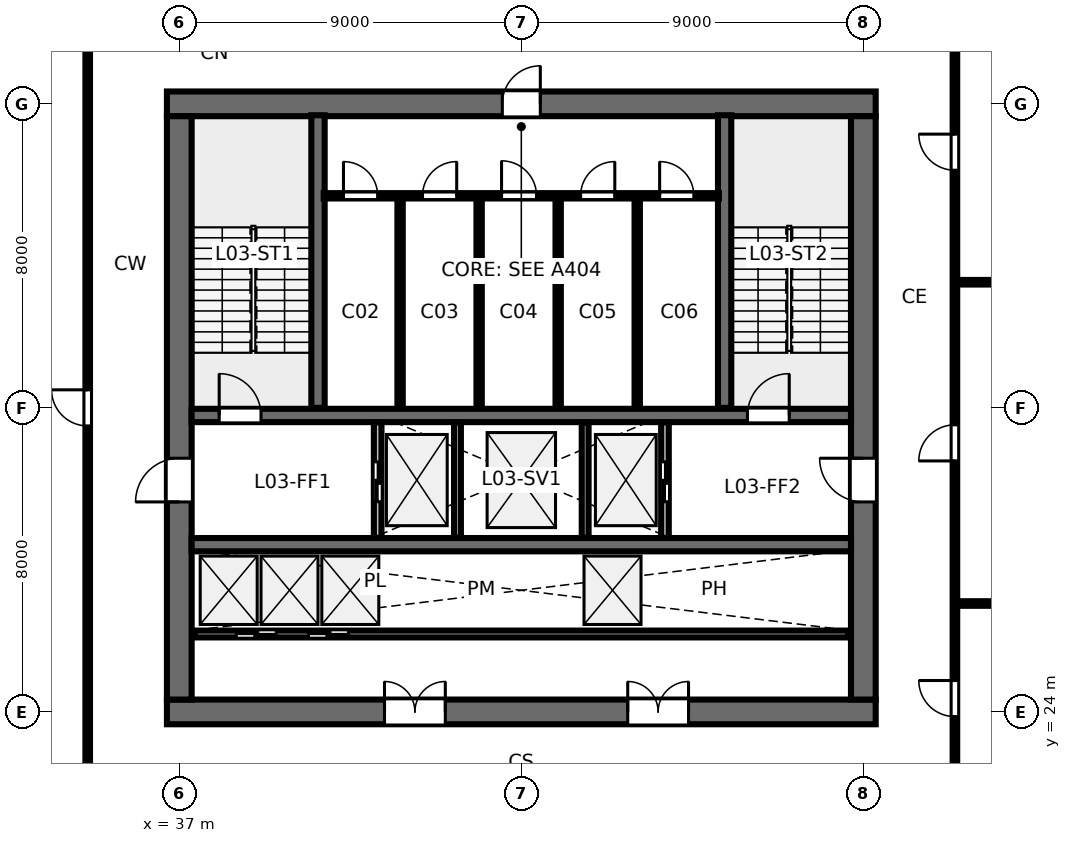
"""IFC4 building model, lengths in metres.
Left out: names, types, materials, properties, quantities, classifications, styles, units other than length and angle.
Written with IfcOpenShell. Run it as: python <this file> out.ifc"""

import sys

from ifc_helpers import new_model, si_unit, direction, frame, frame_2d, origin, place, context, subcontext, project, spatial, rectangle, extrude, element, fill, save


model = new_model("IFC4")
c1 = context("Model", 3, precision=1e-05, world=origin(), true_north=direction((0.0, 1.0)))
c2 = subcontext(c1, "Body", "Model", "MODEL_VIEW")
j1 = project(units=[si_unit("LENGTHUNIT", "METRE"), si_unit("PLANEANGLEUNIT", "RADIAN")], contexts=[c1])
p1 = place(None, origin())
s1 = spatial("IfcSite", under=j1, at=p1, CompositionType="ELEMENT")
p2 = place(p1, origin())
s2 = spatial("IfcBuilding", under=s1, at=p2, CompositionType="ELEMENT")
p3 = place(p2, frame((0.0, 0.0, 14.0)))
s3 = spatial("IfcBuildingStorey", under=s2, at=p3, CompositionType="ELEMENT", Elevation=14.0)
p4 = place(p3, frame((36.675, 24.0, 0.0), z_axis=(0.0, 0.0, 1.0), x_axis=(1.0, 0.0, 0.0)))
e1 = element("IfcWall", 1, at=p4, inside=s3, PredefinedType="SHEAR", context=c2, shape_type="SweptSolid", body=[
    extrude(rectangle(XDim=18.65, YDim=0.65, at=frame_2d((9.325, 0.0))), origin(), (0.0, 0.0, 1.0), 4.22),
])
p5 = place(p4, frame((5.725, 0.0, 0.0)))
e2 = element("IfcOpeningElement", 2, at=p5, cuts=e1, PredefinedType="OPENING", context=c2, shape_type="SweptSolid", body=[
    extrude(rectangle(XDim=1.6, YDim=2.15, at=frame_2d((0.8, 1.075))), frame((0.0, 0.335, 0.0), z_axis=(0.0, -1.0, 0.0), x_axis=(1.0, 0.0, 0.0)), (0.0, 0.0, 1.0), 0.67),
])
p6 = place(p4, frame((12.125, 0.0, 0.0)))
e3 = element("IfcOpeningElement", 3, at=p6, cuts=e1, PredefinedType="OPENING", context=c2, shape_type="SweptSolid", body=[
    extrude(rectangle(XDim=1.6, YDim=2.15, at=frame_2d((0.8, 1.075))), frame((0.0, 0.335, 0.0), z_axis=(0.0, -1.0, 0.0), x_axis=(1.0, 0.0, 0.0)), (0.0, 0.0, 1.0), 0.67),
])
p7 = place(p3, frame((36.675, 40.0, 0.0), z_axis=(0.0, 0.0, 1.0), x_axis=(1.0, 0.0, 0.0)))
e4 = element("IfcWall", 4, at=p7, inside=s3, PredefinedType="SHEAR", context=c2, shape_type="SweptSolid", body=[
    extrude(rectangle(XDim=18.65, YDim=0.65, at=frame_2d((9.325, 0.0))), origin(), (0.0, 0.0, 1.0), 4.22),
])
p8 = place(p7, frame((8.825, 0.0, 0.0)))
e5 = element("IfcOpeningElement", 5, at=p8, cuts=e4, PredefinedType="OPENING", context=c2, shape_type="SweptSolid", body=[
    extrude(rectangle(XDim=1.0, YDim=2.15, at=frame_2d((0.5, 1.075))), frame((0.0, 0.335, 0.0), z_axis=(0.0, -1.0, 0.0), x_axis=(1.0, 0.0, 0.0)), (0.0, 0.0, 1.0), 0.67),
])
p9 = place(p3, frame((37.0, 24.325, 0.0), z_axis=(0.0, 0.0, 1.0), x_axis=(0.0, 1.0, 0.0)))
e6 = element("IfcWall", 6, at=p9, inside=s3, PredefinedType="SHEAR", context=c2, shape_type="SweptSolid", body=[
    extrude(rectangle(XDim=15.35, YDim=0.65, at=frame_2d((7.675, 0.0))), origin(), (0.0, 0.0, 1.0), 4.22),
])
p10 = place(p9, frame((5.2, 0.0, 0.0)))
e7 = element("IfcOpeningElement", 7, at=p10, cuts=e6, PredefinedType="OPENING", context=c2, shape_type="SweptSolid", body=[
    extrude(rectangle(XDim=1.15, YDim=2.15, at=frame_2d((0.575, 1.075))), frame((0.0, 0.335, 0.0), z_axis=(0.0, -1.0, 0.0), x_axis=(1.0, 0.0, 0.0)), (0.0, 0.0, 1.0), 0.67),
])
p11 = place(p3, frame((55.0, 24.325, 0.0), z_axis=(0.0, 0.0, 1.0), x_axis=(0.0, 1.0, 0.0)))
e8 = element("IfcWall", 8, at=p11, inside=s3, PredefinedType="SHEAR", context=c2, shape_type="SweptSolid", body=[
    extrude(rectangle(XDim=15.35, YDim=0.65, at=frame_2d((7.675, 0.0))), origin(), (0.0, 0.0, 1.0), 4.22),
])
p12 = place(p11, frame((5.2, 0.0, 0.0)))
e9 = element("IfcOpeningElement", 9, at=p12, cuts=e8, PredefinedType="OPENING", context=c2, shape_type="SweptSolid", body=[
    extrude(rectangle(XDim=1.15, YDim=2.15, at=frame_2d((0.575, 1.075))), frame((0.0, 0.335, 0.0), z_axis=(0.0, -1.0, 0.0), x_axis=(1.0, 0.0, 0.0)), (0.0, 0.0, 1.0), 0.67),
])
p13 = place(p3, frame((37.325, 31.8, 0.0), z_axis=(0.0, 0.0, 1.0), x_axis=(1.0, 0.0, 0.0)))
e10 = element("IfcWall", 10, at=p13, inside=s3, PredefinedType="SHEAR", context=c2, shape_type="SweptSolid", body=[
    extrude(rectangle(XDim=17.35, YDim=0.35, at=frame_2d((8.675, 0.0))), origin(), (0.0, 0.0, 1.0), 4.22),
])
p14 = place(p13, frame((0.725, 0.0, 0.0)))
e11 = element("IfcOpeningElement", 11, at=p14, cuts=e10, PredefinedType="OPENING", context=c2, shape_type="SweptSolid", body=[
    extrude(rectangle(XDim=1.1, YDim=2.15, at=frame_2d((0.55, 1.075))), frame((0.0, 0.185, 0.0), z_axis=(0.0, -1.0, 0.0), x_axis=(1.0, 0.0, 0.0)), (0.0, 0.0, 1.0), 0.37),
])
p15 = place(p13, frame((14.625, 0.0, 0.0)))
e12 = element("IfcOpeningElement", 12, at=p15, cuts=e10, PredefinedType="OPENING", context=c2, shape_type="SweptSolid", body=[
    extrude(rectangle(XDim=1.1, YDim=2.15, at=frame_2d((0.55, 1.075))), frame((0.0, 0.185, 0.0), z_axis=(0.0, -1.0, 0.0), x_axis=(1.0, 0.0, 0.0)), (0.0, 0.0, 1.0), 0.37),
])
p16 = place(p3, frame((37.325, 28.4, 0.0), z_axis=(0.0, 0.0, 1.0), x_axis=(1.0, 0.0, 0.0)))
e13 = element("IfcWall", 13, at=p16, inside=s3, PredefinedType="SHEAR", context=c2, shape_type="SweptSolid", body=[
    extrude(rectangle(XDim=17.35, YDim=0.35, at=frame_2d((8.675, 0.0))), origin(), (0.0, 0.0, 1.0), 4.22),
])
for number, where, z_axis, x_axis in (
    (14, (40.65, 32.0, 0.0), (0.0, 0.0, 1.0), (0.0, 1.0, 0.0)),
    (15, (51.35, 32.0, 0.0), (0.0, 0.0, 1.0), (0.0, 1.0, 0.0)),
):
    element("IfcWall", number, at=place(p3, frame(where, z_axis=z_axis, x_axis=x_axis)), inside=s3, PredefinedType="SHEAR", context=c2, shape_type="SweptSolid", body=[
        extrude(rectangle(XDim=7.7, YDim=0.35, at=frame_2d((3.85, 0.0))), origin(), (0.0, 0.0, 1.0), 4.5),
    ])
for number, where, z_axis, x_axis in (
    (16, (42.81, 32.05, 0.0), (0.0, 0.0, 1.0), (0.0, 1.0, 0.0)),
    (17, (44.89, 32.05, 0.0), (0.0, 0.0, 1.0), (0.0, 1.0, 0.0)),
    (18, (46.97, 32.05, 0.0), (0.0, 0.0, 1.0), (0.0, 1.0, 0.0)),
    (19, (49.05, 32.05, 0.0), (0.0, 0.0, 1.0), (0.0, 1.0, 0.0)),
):
    element("IfcWall", number, at=place(p3, frame(where, z_axis=z_axis, x_axis=x_axis)), inside=s3, PredefinedType="PARTITIONING", context=c2, shape_type="SweptSolid", body=[
        extrude(rectangle(XDim=5.5, YDim=0.14, at=frame_2d((2.75, 0.0))), origin(), (0.0, 0.0, 1.0), 4.21),
    ])
p17 = place(p3, frame((40.8, 37.58, 0.0), z_axis=(0.0, 0.0, 1.0), x_axis=(1.0, 0.0, 0.0)))
e20 = element("IfcWall", 20, at=p17, inside=s3, PredefinedType="PARTITIONING", context=c2, shape_type="SweptSolid", body=[
    extrude(rectangle(XDim=10.4, YDim=0.14, at=frame_2d((5.2, 0.0))), origin(), (0.0, 0.0, 1.0), 4.21),
])
p18 = place(p17, frame((0.52, 0.0, 0.0)))
e21 = element("IfcOpeningElement", 21, at=p18, cuts=e20, PredefinedType="OPENING", context=c2, shape_type="SweptSolid", body=[
    extrude(rectangle(XDim=0.9, YDim=2.15, at=frame_2d((0.45, 1.075))), frame((0.0, 0.08, 0.0), z_axis=(0.0, -1.0, 0.0), x_axis=(1.0, 0.0, 0.0)), (0.0, 0.0, 1.0), 0.16),
])
p19 = place(p17, frame((2.6, 0.0, 0.0)))
e22 = element("IfcOpeningElement", 22, at=p19, cuts=e20, PredefinedType="OPENING", context=c2, shape_type="SweptSolid", body=[
    extrude(rectangle(XDim=0.9, YDim=2.15, at=frame_2d((0.45, 1.075))), frame((0.0, 0.08, 0.0), z_axis=(0.0, -1.0, 0.0), x_axis=(1.0, 0.0, 0.0)), (0.0, 0.0, 1.0), 0.16),
])
p20 = place(p17, frame((4.68, 0.0, 0.0)))
e23 = element("IfcOpeningElement", 23, at=p20, cuts=e20, PredefinedType="OPENING", context=c2, shape_type="SweptSolid", body=[
    extrude(rectangle(XDim=0.92, YDim=2.15, at=frame_2d((0.46, 1.075))), frame((0.0, 0.08, 0.0), z_axis=(0.0, -1.0, 0.0), x_axis=(1.0, 0.0, 0.0)), (0.0, 0.0, 1.0), 0.16),
])
p21 = place(p17, frame((6.76, 0.0, 0.0)))
e24 = element("IfcOpeningElement", 24, at=p21, cuts=e20, PredefinedType="OPENING", context=c2, shape_type="SweptSolid", body=[
    extrude(rectangle(XDim=0.9, YDim=2.15, at=frame_2d((0.45, 1.075))), frame((0.0, 0.08, 0.0), z_axis=(0.0, -1.0, 0.0), x_axis=(1.0, 0.0, 0.0)), (0.0, 0.0, 1.0), 0.16),
])
p22 = place(p17, frame((8.84, 0.0, 0.0)))
e25 = element("IfcOpeningElement", 25, at=p22, cuts=e20, PredefinedType="OPENING", context=c2, shape_type="SweptSolid", body=[
    extrude(rectangle(XDim=0.9, YDim=2.15, at=frame_2d((0.45, 1.075))), frame((0.0, 0.08, 0.0), z_axis=(0.0, -1.0, 0.0), x_axis=(1.0, 0.0, 0.0)), (0.0, 0.0, 1.0), 0.16),
])
p23 = place(p3, frame((42.22, 28.58, 0.0), z_axis=(0.0, 0.0, 1.0), x_axis=(0.0, 1.0, 0.0)))
e26 = element("IfcWall", 26, at=p23, inside=s3, PredefinedType="PARTITIONING", context=c2, shape_type="SweptSolid", body=[
    extrude(rectangle(XDim=3.04, YDim=0.2, at=frame_2d((1.52, 0.0))), origin(), (0.0, 0.0, 1.0), 4.21),
])
p24 = place(p23, frame((0.95, 0.0, 0.0)))
e27 = element("IfcOpeningElement", 27, at=p24, cuts=e26, PredefinedType="OPENING", context=c2, shape_type="SweptSolid", body=[
    extrude(rectangle(XDim=1.05, YDim=2.15, at=frame_2d((0.525, 1.075))), frame((0.0, 0.11, 0.0), z_axis=(0.0, -1.0, 0.0), x_axis=(1.0, 0.0, 0.0)), (0.0, 0.0, 1.0), 0.22),
])
p25 = place(p3, frame((49.78, 28.58, 0.0), z_axis=(0.0, 0.0, 1.0), x_axis=(0.0, 1.0, 0.0)))
e28 = element("IfcWall", 28, at=p25, inside=s3, PredefinedType="PARTITIONING", context=c2, shape_type="SweptSolid", body=[
    extrude(rectangle(XDim=3.04, YDim=0.2, at=frame_2d((1.52, 0.0))), origin(), (0.0, 0.0, 1.0), 4.21),
])
p26 = place(p25, frame((0.95, 0.0, 0.0)))
e29 = element("IfcOpeningElement", 29, at=p26, cuts=e28, PredefinedType="OPENING", context=c2, shape_type="SweptSolid", body=[
    extrude(rectangle(XDim=1.05, YDim=2.15, at=frame_2d((0.525, 1.075))), frame((0.0, 0.11, 0.0), z_axis=(0.0, -1.0, 0.0), x_axis=(1.0, 0.0, 0.0)), (0.0, 0.0, 1.0), 0.22),
])
for number, where, z_axis, x_axis in (
    (30, (44.32, 28.58, 0.0), (0.0, 0.0, 1.0), (0.0, 1.0, 0.0)),
    (31, (47.68, 28.58, 0.0), (0.0, 0.0, 1.0), (0.0, 1.0, 0.0)),
):
    element("IfcWall", number, at=place(p3, frame(where, z_axis=z_axis, x_axis=x_axis)), inside=s3, PredefinedType="PARTITIONING", context=c2, shape_type="SweptSolid", body=[
        extrude(rectangle(XDim=3.04, YDim=0.18, at=frame_2d((1.52, 0.0))), origin(), (0.0, 0.0, 1.0), 4.21),
    ])
p27 = place(p3, frame((37.4, 26.05, 0.0), z_axis=(0.0, 0.0, 1.0), x_axis=(1.0, 0.0, 0.0)))
e32 = element("IfcWall", 32, at=p27, inside=s3, PredefinedType="PARTITIONING", context=c2, shape_type="SweptSolid", body=[
    extrude(rectangle(XDim=17.2, YDim=0.18, at=frame_2d((8.6, 0.0))), origin(), (0.0, 0.0, 1.0), 4.21),
])
p28 = place(p27, frame((1.1, 0.0, 0.0)))
e33 = element("IfcOpeningElement", 33, at=p28, cuts=e32, PredefinedType="OPENING", context=c2, shape_type="SweptSolid", body=[
    extrude(rectangle(XDim=1.05, YDim=2.15, at=frame_2d((0.525, 1.075))), frame((0.0, 0.1, 0.0), z_axis=(0.0, -1.0, 0.0), x_axis=(1.0, 0.0, 0.0)), (0.0, 0.0, 1.0), 0.2),
])
p29 = place(p27, frame((3.0, 0.0, 0.0)))
e34 = element("IfcOpeningElement", 34, at=p29, cuts=e32, PredefinedType="OPENING", context=c2, shape_type="SweptSolid", body=[
    extrude(rectangle(XDim=1.05, YDim=2.15, at=frame_2d((0.525, 1.075))), frame((0.0, 0.1, 0.0), z_axis=(0.0, -1.0, 0.0), x_axis=(1.0, 0.0, 0.0)), (0.0, 0.0, 1.0), 0.2),
])
p30 = place(p3, frame((34.59, 21.65, 0.0), z_axis=(0.0, 0.0, 1.0), x_axis=(0.0, 1.0, 0.0)))
e35 = element("IfcWall", 35, at=p30, inside=s3, PredefinedType="PARTITIONING", context=c2, shape_type="SweptSolid", body=[
    extrude(rectangle(XDim=20.7, YDim=0.12, at=frame_2d((10.35, 0.0))), origin(), (0.0, 0.0, 1.0), 3.31),
])
p31 = place(p30, frame((9.875, 0.0, 0.0)))
e36 = element("IfcOpeningElement", 36, at=p31, cuts=e35, PredefinedType="OPENING", context=c2, shape_type="SweptSolid", body=[
    extrude(rectangle(XDim=0.95, YDim=2.15, at=frame_2d((0.475, 1.075))), frame((0.0, 0.07, 0.0), z_axis=(0.0, -1.0, 0.0), x_axis=(1.0, 0.0, 0.0)), (0.0, 0.0, 1.0), 0.14),
])
p32 = place(p3, frame((57.41, 26.852, 0.0), z_axis=(0.0, 0.0, 1.0), x_axis=(1.0, 0.0, 0.0)))
e37 = element("IfcWall", 37, at=p32, inside=s3, PredefinedType="PARTITIONING", context=c2, shape_type="SweptSolid", body=[
    extrude(rectangle(XDim=21.95, YDim=0.12, at=frame_2d((10.975, 0.0))), origin(), (0.0, 0.0, 1.0), 3.31),
])
p33 = place(p32, frame((1.4, 0.0, 0.0)))
e38 = element("IfcOpeningElement", 38, at=p33, cuts=e37, PredefinedType="OPENING", context=c2, shape_type="SweptSolid", body=[
    extrude(rectangle(XDim=0.9, YDim=2.15, at=frame_2d((0.45, 1.075))), frame((0.0, 0.07, 0.0), z_axis=(0.0, -1.0, 0.0), x_axis=(1.0, 0.0, 0.0)), (0.0, 0.0, 1.0), 0.14),
])
p34 = place(p3, frame((57.41, 35.306, 0.0), z_axis=(0.0, 0.0, 1.0), x_axis=(1.0, 0.0, 0.0)))
e39 = element("IfcWall", 39, at=p34, inside=s3, PredefinedType="PARTITIONING", context=c2, shape_type="SweptSolid", body=[
    extrude(rectangle(XDim=6.24, YDim=0.12, at=frame_2d((3.12, 0.0))), origin(), (0.0, 0.0, 1.0), 3.31),
])
p35 = place(p34, frame((1.4, 0.0, 0.0)))
e40 = element("IfcOpeningElement", 40, at=p35, cuts=e39, PredefinedType="OPENING", context=c2, shape_type="SweptSolid", body=[
    extrude(rectangle(XDim=0.9, YDim=2.15, at=frame_2d((0.45, 1.075))), frame((0.0, 0.07, 0.0), z_axis=(0.0, -1.0, 0.0), x_axis=(1.0, 0.0, 0.0)), (0.0, 0.0, 1.0), 0.14),
])
p36 = place(p3, frame((57.41, 21.65, 0.0), z_axis=(0.0, 0.0, 1.0), x_axis=(0.0, 1.0, 0.0)))
e41 = element("IfcWall", 41, at=p36, inside=s3, PredefinedType="PARTITIONING", context=c2, shape_type="SweptSolid", body=[
    extrude(rectangle(XDim=20.7, YDim=0.12, at=frame_2d((10.35, 0.0))), origin(), (0.0, 0.0, 1.0), 3.31),
])
p37 = place(p36, frame((2.226, 0.0, 0.0)))
e42 = element("IfcOpeningElement", 42, at=p37, cuts=e41, PredefinedType="OPENING", context=c2, shape_type="SweptSolid", body=[
    extrude(rectangle(XDim=0.95, YDim=2.15, at=frame_2d((0.475, 1.075))), frame((0.0, 0.07, 0.0), z_axis=(0.0, -1.0, 0.0), x_axis=(1.0, 0.0, 0.0)), (0.0, 0.0, 1.0), 0.14),
])
p38 = place(p36, frame((8.954, 0.0, 0.0)))
e43 = element("IfcOpeningElement", 43, at=p38, cuts=e41, PredefinedType="OPENING", context=c2, shape_type="SweptSolid", body=[
    extrude(rectangle(XDim=0.95, YDim=2.15, at=frame_2d((0.475, 1.075))), frame((0.0, 0.07, 0.0), z_axis=(0.0, -1.0, 0.0), x_axis=(1.0, 0.0, 0.0)), (0.0, 0.0, 1.0), 0.14),
])
p39 = place(p36, frame((16.603, 0.0, 0.0)))
e44 = element("IfcOpeningElement", 44, at=p39, cuts=e41, PredefinedType="OPENING", context=c2, shape_type="SweptSolid", body=[
    extrude(rectangle(XDim=0.95, YDim=2.15, at=frame_2d((0.475, 1.075))), frame((0.0, 0.07, 0.0), z_axis=(0.0, -1.0, 0.0), x_axis=(1.0, 0.0, 0.0)), (0.0, 0.0, 1.0), 0.14),
])
p40 = place(p14, origin())
e45 = element("IfcDoor", 45, at=p40, inside=s3, OperationType="SINGLE_SWING_LEFT", PredefinedType="DOOR", context=c2, shape_type="SweptSolid", body=[
    extrude(rectangle(XDim=1.1, YDim=2.15, at=frame_2d((0.55, 1.075))), frame((0.0, 0.025, 0.0), z_axis=(0.0, -1.0, 0.0), x_axis=(1.0, 0.0, 0.0)), (0.0, 0.0, 1.0), 0.05),
])
fill(e11, e45)
p41 = place(p15, origin())
e46 = element("IfcDoor", 46, at=p41, inside=s3, OperationType="SINGLE_SWING_RIGHT", PredefinedType="DOOR", context=c2, shape_type="SweptSolid", body=[
    extrude(rectangle(XDim=1.1, YDim=2.15, at=frame_2d((0.55, 1.075))), frame((0.0, 0.025, 0.0), z_axis=(0.0, -1.0, 0.0), x_axis=(1.0, 0.0, 0.0)), (0.0, 0.0, 1.0), 0.05),
])
fill(e12, e46)
p42 = place(p8, origin())
e47 = element("IfcDoor", 47, at=p42, inside=s3, OperationType="SINGLE_SWING_RIGHT", PredefinedType="DOOR", context=c2, shape_type="SweptSolid", body=[
    extrude(rectangle(XDim=1.0, YDim=2.15, at=frame_2d((0.5, 1.075))), frame((0.0, 0.025, 0.0), z_axis=(0.0, -1.0, 0.0), x_axis=(1.0, 0.0, 0.0)), (0.0, 0.0, 1.0), 0.05),
])
fill(e5, e47)
p43 = place(p10, origin())
e48 = element("IfcDoor", 48, at=p43, inside=s3, OperationType="SINGLE_SWING_LEFT", PredefinedType="DOOR", context=c2, shape_type="SweptSolid", body=[
    extrude(rectangle(XDim=1.15, YDim=2.15, at=frame_2d((0.575, 1.075))), frame((0.0, 0.025, 0.0), z_axis=(0.0, -1.0, 0.0), x_axis=(1.0, 0.0, 0.0)), (0.0, 0.0, 1.0), 0.05),
])
fill(e7, e48)
p44 = place(p12, origin())
e49 = element("IfcDoor", 49, at=p44, inside=s3, OperationType="SINGLE_SWING_RIGHT", PredefinedType="DOOR", context=c2, shape_type="SweptSolid", body=[
    extrude(rectangle(XDim=1.15, YDim=2.15, at=frame_2d((0.575, 1.075))), frame((0.0, 0.025, 0.0), z_axis=(0.0, -1.0, 0.0), x_axis=(1.0, 0.0, 0.0)), (0.0, 0.0, 1.0), 0.05),
])
fill(e9, e49)
p45 = place(p5, origin())
e50 = element("IfcDoor", 50, at=p45, inside=s3, OperationType="DOUBLE_DOOR_SINGLE_SWING", PredefinedType="DOOR", context=c2, shape_type="SweptSolid", body=[
    extrude(rectangle(XDim=1.6, YDim=2.15, at=frame_2d((0.8, 1.075))), frame((0.0, 0.025, 0.0), z_axis=(0.0, -1.0, 0.0), x_axis=(1.0, 0.0, 0.0)), (0.0, 0.0, 1.0), 0.05),
])
fill(e2, e50)
p46 = place(p6, origin())
e51 = element("IfcDoor", 51, at=p46, inside=s3, OperationType="DOUBLE_DOOR_SINGLE_SWING", PredefinedType="DOOR", context=c2, shape_type="SweptSolid", body=[
    extrude(rectangle(XDim=1.6, YDim=2.15, at=frame_2d((0.8, 1.075))), frame((0.0, 0.025, 0.0), z_axis=(0.0, -1.0, 0.0), x_axis=(1.0, 0.0, 0.0)), (0.0, 0.0, 1.0), 0.05),
])
fill(e3, e51)
p47 = place(p18, origin())
e52 = element("IfcDoor", 52, at=p47, inside=s3, OperationType="SINGLE_SWING_LEFT", PredefinedType="DOOR", context=c2, shape_type="SweptSolid", body=[
    extrude(rectangle(XDim=0.9, YDim=2.15, at=frame_2d((0.45, 1.075))), frame((0.0, 0.025, 0.0), z_axis=(0.0, -1.0, 0.0), x_axis=(1.0, 0.0, 0.0)), (0.0, 0.0, 1.0), 0.05),
])
fill(e21, e52)
p48 = place(p19, origin())
e53 = element("IfcDoor", 53, at=p48, inside=s3, OperationType="SINGLE_SWING_RIGHT", PredefinedType="DOOR", context=c2, shape_type="SweptSolid", body=[
    extrude(rectangle(XDim=0.9, YDim=2.15, at=frame_2d((0.45, 1.075))), frame((0.0, 0.025, 0.0), z_axis=(0.0, -1.0, 0.0), x_axis=(1.0, 0.0, 0.0)), (0.0, 0.0, 1.0), 0.05),
])
fill(e22, e53)
p49 = place(p20, origin())
e54 = element("IfcDoor", 54, at=p49, inside=s3, OperationType="SINGLE_SWING_LEFT", PredefinedType="DOOR", context=c2, shape_type="SweptSolid", body=[
    extrude(rectangle(XDim=0.92, YDim=2.15, at=frame_2d((0.46, 1.075))), frame((0.0, 0.025, 0.0), z_axis=(0.0, -1.0, 0.0), x_axis=(1.0, 0.0, 0.0)), (0.0, 0.0, 1.0), 0.05),
])
fill(e23, e54)
p50 = place(p21, origin())
e55 = element("IfcDoor", 55, at=p50, inside=s3, OperationType="SINGLE_SWING_RIGHT", PredefinedType="DOOR", context=c2, shape_type="SweptSolid", body=[
    extrude(rectangle(XDim=0.9, YDim=2.15, at=frame_2d((0.45, 1.075))), frame((0.0, 0.025, 0.0), z_axis=(0.0, -1.0, 0.0), x_axis=(1.0, 0.0, 0.0)), (0.0, 0.0, 1.0), 0.05),
])
fill(e24, e55)
p51 = place(p22, origin())
e56 = element("IfcDoor", 56, at=p51, inside=s3, OperationType="SINGLE_SWING_LEFT", PredefinedType="DOOR", context=c2, shape_type="SweptSolid", body=[
    extrude(rectangle(XDim=0.9, YDim=2.15, at=frame_2d((0.45, 1.075))), frame((0.0, 0.025, 0.0), z_axis=(0.0, -1.0, 0.0), x_axis=(1.0, 0.0, 0.0)), (0.0, 0.0, 1.0), 0.05),
])
fill(e25, e56)
p52 = place(p24, origin())
e57 = element("IfcDoor", 57, at=p52, inside=s3, OperationType="SLIDING_TO_LEFT", PredefinedType="DOOR", context=c2, shape_type="SweptSolid", body=[
    extrude(rectangle(XDim=1.05, YDim=2.15, at=frame_2d((0.525, 1.075))), frame((0.0, 0.025, 0.0), z_axis=(0.0, -1.0, 0.0), x_axis=(1.0, 0.0, 0.0)), (0.0, 0.0, 1.0), 0.05),
])
fill(e27, e57)
p53 = place(p26, origin())
e58 = element("IfcDoor", 58, at=p53, inside=s3, OperationType="SLIDING_TO_RIGHT", PredefinedType="DOOR", context=c2, shape_type="SweptSolid", body=[
    extrude(rectangle(XDim=1.05, YDim=2.15, at=frame_2d((0.525, 1.075))), frame((0.0, 0.025, 0.0), z_axis=(0.0, -1.0, 0.0), x_axis=(1.0, 0.0, 0.0)), (0.0, 0.0, 1.0), 0.05),
])
fill(e29, e58)
p54 = place(p28, origin())
e59 = element("IfcDoor", 59, at=p54, inside=s3, OperationType="SLIDING_TO_LEFT", PredefinedType="DOOR", context=c2, shape_type="SweptSolid", body=[
    extrude(rectangle(XDim=1.05, YDim=2.15, at=frame_2d((0.525, 1.075))), frame((0.0, 0.025, 0.0), z_axis=(0.0, -1.0, 0.0), x_axis=(1.0, 0.0, 0.0)), (0.0, 0.0, 1.0), 0.05),
])
fill(e33, e59)
p55 = place(p29, origin())
e60 = element("IfcDoor", 60, at=p55, inside=s3, OperationType="SLIDING_TO_RIGHT", PredefinedType="DOOR", context=c2, shape_type="SweptSolid", body=[
    extrude(rectangle(XDim=1.05, YDim=2.15, at=frame_2d((0.525, 1.075))), frame((0.0, 0.025, 0.0), z_axis=(0.0, -1.0, 0.0), x_axis=(1.0, 0.0, 0.0)), (0.0, 0.0, 1.0), 0.05),
])
fill(e34, e60)
p56 = place(p31, origin())
e61 = element("IfcDoor", 61, at=p56, inside=s3, OperationType="SINGLE_SWING_RIGHT", PredefinedType="DOOR", context=c2, shape_type="SweptSolid", body=[
    extrude(rectangle(XDim=0.95, YDim=2.15, at=frame_2d((0.475, 1.075))), frame((0.0, 0.025, 0.0), z_axis=(0.0, -1.0, 0.0), x_axis=(1.0, 0.0, 0.0)), (0.0, 0.0, 1.0), 0.05),
])
fill(e36, e61)
p57 = place(p37, origin())
e62 = element("IfcDoor", 62, at=p57, inside=s3, OperationType="SINGLE_SWING_RIGHT", PredefinedType="DOOR", context=c2, shape_type="SweptSolid", body=[
    extrude(rectangle(XDim=0.95, YDim=2.15, at=frame_2d((0.475, 1.075))), frame((0.0, 0.025, 0.0), z_axis=(0.0, -1.0, 0.0), x_axis=(1.0, 0.0, 0.0)), (0.0, 0.0, 1.0), 0.05),
])
fill(e42, e62)
p58 = place(p38, origin())
e63 = element("IfcDoor", 63, at=p58, inside=s3, OperationType="SINGLE_SWING_LEFT", PredefinedType="DOOR", context=c2, shape_type="SweptSolid", body=[
    extrude(rectangle(XDim=0.95, YDim=2.15, at=frame_2d((0.475, 1.075))), frame((0.0, 0.025, 0.0), z_axis=(0.0, -1.0, 0.0), x_axis=(1.0, 0.0, 0.0)), (0.0, 0.0, 1.0), 0.05),
])
fill(e43, e63)
p59 = place(p39, origin())
e64 = element("IfcDoor", 64, at=p59, inside=s3, OperationType="SINGLE_SWING_RIGHT", PredefinedType="DOOR", context=c2, shape_type="SweptSolid", body=[
    extrude(rectangle(XDim=0.95, YDim=2.15, at=frame_2d((0.475, 1.075))), frame((0.0, 0.025, 0.0), z_axis=(0.0, -1.0, 0.0), x_axis=(1.0, 0.0, 0.0)), (0.0, 0.0, 1.0), 0.05),
])
fill(e44, e64)
save(model, sys.argv[1])
